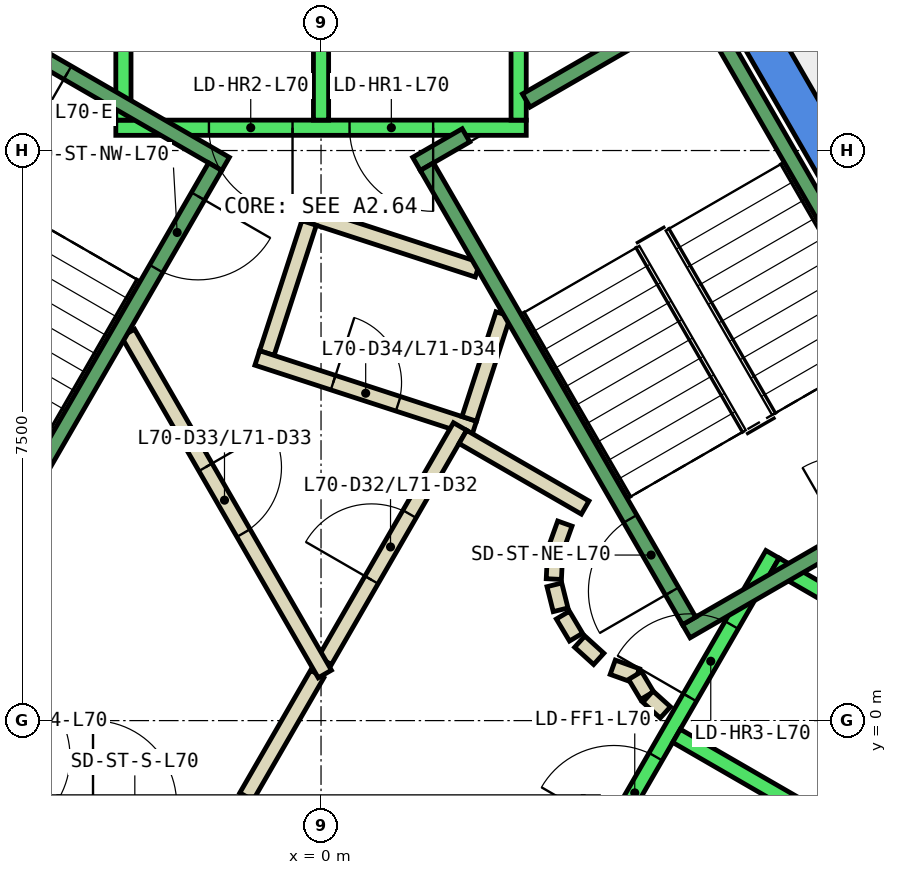
"""IFC4 building model, lengths in metres.
Left out: names, types, materials, properties, quantities, classifications, styles, units other than length and angle.
Written with IfcOpenShell. Run it as: python <this file> out.ifc"""

import sys

from ifc_helpers import new_model, si_unit, direction, frame, frame_2d, origin, place, context, subcontext, project, spatial, polyline, rectangle, outline, extrude, element, fill, save


model = new_model("IFC4")
c1 = context("Model", 3, precision=1e-05, world=origin(), true_north=direction((0.0, 1.0)))
c2 = subcontext(c1, "Body", "Model", "MODEL_VIEW")
j1 = project(units=[si_unit("LENGTHUNIT", "METRE"), si_unit("PLANEANGLEUNIT", "RADIAN")], contexts=[c1])
p1 = place(None, origin())
s1 = spatial("IfcSite", under=j1, at=p1, CompositionType="ELEMENT")
p2 = place(p1, origin())
s2 = spatial("IfcBuilding", under=s1, at=p2, CompositionType="ELEMENT")
p3 = place(p2, frame((0.0, 0.0, 300.8)))
s3 = spatial("IfcBuildingStorey", under=s2, at=p3, CompositionType="ELEMENT", Elevation=300.8)
p4 = place(p3, frame((0.0, 0.0, -0.34)))
e1 = element("IfcWall", 1, at=p4, inside=s3, PredefinedType="SHEAR", context=c2, shape_type="SweptSolid", body=[
    extrude(outline(polyline([(5.486, 9.998), (5.053, 9.748), (9.238, 2.5), (9.815, 2.5), (5.486, 9.998)])), origin(), (0.0, 0.0, 1.0), 3.6),
])
p5 = place(p3, frame((0.0, 0.0, -0.34)))
e2 = element("IfcWall", 2, at=p5, inside=s3, PredefinedType="SHEAR", context=c2, shape_type="SweptSolid", body=[
    extrude(outline(polyline([(4.907, -6.0), (9.815, 2.5), (9.238, 2.5), (4.619, -5.5), (4.907, -6.0)])), origin(), (0.0, 0.0, 1.0), 3.6),
])
p6 = place(p3, frame((2.06, 5.931, 0.0), z_axis=(0.0, 0.0, 1.0), x_axis=(-0.95092855133, 0.309410552932, 0.0)))
e3 = element("IfcWall", 3, at=p6, inside=s3, PredefinedType="PARTITIONING", context=c2, shape_type="SweptSolid", body=[
    extrude(rectangle(XDim=2.399, YDim=0.2, at=frame_2d((1.199, 0.0))), origin(), (0.0, 0.0, 1.0), 3.26),
])
p7 = place(p3, frame((-0.157, 6.547, 0.0), z_axis=(0.0, 0.0, 1.0), x_axis=(-0.308813127339, -0.951122732555, 0.0)))
e4 = element("IfcWall", 4, at=p7, inside=s3, PredefinedType="PARTITIONING", context=c2, shape_type="SweptSolid", body=[
    extrude(rectangle(XDim=1.8, YDim=0.2, at=frame_2d((0.9, 0.0))), origin(), (0.0, 0.0, 1.0), 3.26),
])
p8 = place(p3, frame((-0.839, 4.771, 0.0), z_axis=(0.0, 0.0, 1.0), x_axis=(0.950961084355, -0.309310549515, 0.0)))
e5 = element("IfcWall", 5, at=p8, inside=s3, PredefinedType="PARTITIONING", context=c2, shape_type="SweptSolid", body=[
    extrude(rectangle(XDim=3.0, YDim=0.2, at=frame_2d((1.5, 0.0))), origin(), (0.0, 0.0, 1.0), 3.26),
])
p9 = place(p8, frame((1.05, 0.0, 0.0)))
e6 = element("IfcOpeningElement", 6, at=p9, cuts=e5, PredefinedType="OPENING", context=c2, shape_type="SweptSolid", body=[
    extrude(rectangle(XDim=0.9, YDim=2.1, at=frame_2d((0.45, 1.05))), frame((0.0, 0.11, 0.0), z_axis=(0.0, -1.0, 0.0), x_axis=(1.0, 0.0, 0.0)), (0.0, 0.0, 1.0), 0.22),
])
p10 = place(p3, frame((1.95, 3.97, 0.0), z_axis=(0.0, 0.0, 1.0), x_axis=(0.308583003896, 0.951197418892, 0.0)))
e7 = element("IfcWall", 7, at=p10, inside=s3, PredefinedType="PARTITIONING", context=c2, shape_type="SweptSolid", body=[
    extrude(rectangle(XDim=1.449, YDim=0.2, at=frame_2d((0.724, 0.0))), origin(), (0.0, 0.0, 1.0), 3.26),
])
p11 = place(p3, frame((-0.982, -1.0, 0.0), z_axis=(0.0, 0.0, 1.0), x_axis=(0.50024047865, 0.865886518847, 0.0)))
e8 = element("IfcWall", 8, at=p11, inside=s3, PredefinedType="PARTITIONING", context=c2, shape_type="SweptSolid", body=[
    extrude(rectangle(XDim=1.863, YDim=0.2, at=frame_2d((0.931, 0.0))), origin(), (0.0, 0.0, 1.0), 3.26),
])
p12 = place(p3, frame((0.05, 0.787, 0.0), z_axis=(0.0, 0.0, 1.0), x_axis=(0.499954076797, 0.866051915934, 0.0)))
e9 = element("IfcWall", 9, at=p12, inside=s3, PredefinedType="PARTITIONING", context=c2, shape_type="SweptSolid", body=[
    extrude(rectangle(XDim=3.558, YDim=0.2, at=frame_2d((1.779, 0.0))), origin(), (0.0, 0.0, 1.0), 3.26),
])
p13 = place(p12, frame((1.229, 0.0, 0.0)))
e10 = element("IfcOpeningElement", 10, at=p13, cuts=e9, PredefinedType="OPENING", context=c2, shape_type="SweptSolid", body=[
    extrude(rectangle(XDim=1.0, YDim=2.1, at=frame_2d((0.5, 1.05))), frame((0.0, 0.11, 0.0), z_axis=(0.0, -1.0, 0.0), x_axis=(1.0, 0.0, 0.0)), (0.0, 0.0, 1.0), 0.22),
])
p14 = place(p3, frame((1.866, 3.732, 0.0), z_axis=(0.0, 0.0, 1.0), x_axis=(0.866043361281, -0.499968895414, 0.0)))
e11 = element("IfcWall", 11, at=p14, inside=s3, PredefinedType="PARTITIONING", context=c2, shape_type="SweptSolid", body=[
    extrude(rectangle(XDim=1.858, YDim=0.2, at=frame_2d((0.929, 0.0))), origin(), (0.0, 0.0, 1.0), 3.26),
])
p15 = place(p3, frame((3.208, 2.592, 0.0), z_axis=(0.0, 0.0, 1.0), x_axis=(-0.337388820924, -0.941365382578, 0.0)))
e12 = element("IfcWall", 12, at=p15, inside=s3, PredefinedType="PARTITIONING", context=c2, shape_type="SweptSolid", body=[
    extrude(rectangle(XDim=0.338, YDim=0.2, at=frame_2d((0.169, 0.0))), origin(), (0.0, 0.0, 1.0), 3.26),
])
p16 = place(p3, frame((3.079, 2.199, 0.0), z_axis=(0.0, 0.0, 1.0), x_axis=(-0.047771483479, -0.998858290933, 0.0)))
e13 = element("IfcWall", 13, at=p16, inside=s3, PredefinedType="PARTITIONING", context=c2, shape_type="SweptSolid", body=[
    extrude(rectangle(XDim=0.337, YDim=0.2, at=frame_2d((0.169, 0.0))), origin(), (0.0, 0.0, 1.0), 3.26),
])
p17 = place(p3, frame((3.07, 1.786, 0.0), z_axis=(0.0, 0.0, 1.0), x_axis=(0.242705583207, -0.970099994784, 0.0)))
e14 = element("IfcWall", 14, at=p17, inside=s3, PredefinedType="PARTITIONING", context=c2, shape_type="SweptSolid", body=[
    extrude(rectangle(XDim=0.338, YDim=0.2, at=frame_2d((0.169, 0.0))), origin(), (0.0, 0.0, 1.0), 3.26),
])
for number, where, z_axis, x_axis in (
    (15, (3.182, 1.388, 0.0), (0.0, 0.0, 1.0), (0.512, -0.859, 0.0)),
    (16, (3.404, 1.039, 0.0), (0.0, 0.0, 1.0), (0.74, -0.672, 0.0)),
):
    element("IfcWall", number, at=place(p3, frame(where, z_axis=z_axis, x_axis=x_axis)), inside=s3, PredefinedType="PARTITIONING", context=c2, shape_type="SweptSolid", body=[
        extrude(rectangle(XDim=0.338, YDim=0.2, at=frame_2d((0.169, 0.0))), origin(), (0.0, 0.0, 1.0), 3.26),
    ])
p18 = place(p3, frame((3.838, 0.702, 0.0), z_axis=(0.0, 0.0, 1.0), x_axis=(0.941035081519, -0.338308993895, 0.0)))
e17 = element("IfcWall", 17, at=p18, inside=s3, PredefinedType="PARTITIONING", context=c2, shape_type="SweptSolid", body=[
    extrude(rectangle(XDim=0.337, YDim=0.2, at=frame_2d((0.168, 0.0))), origin(), (0.0, 0.0, 1.0), 3.26),
])
p19 = place(p3, frame((4.132, 0.593, 0.0), z_axis=(0.0, 0.0, 1.0), x_axis=(0.513561617048, -0.858052717201, 0.0)))
e18 = element("IfcWall", 18, at=p19, inside=s3, PredefinedType="PARTITIONING", context=c2, shape_type="SweptSolid", body=[
    extrude(rectangle(XDim=0.308, YDim=0.2, at=frame_2d((0.154, 0.0))), origin(), (0.0, 0.0, 1.0), 3.26),
])
p20 = place(p3, frame((4.301, 0.315, 0.0), z_axis=(0.0, 0.0, 1.0), x_axis=(0.741798017506, -0.670623367639, 0.0)))
e19 = element("IfcWall", 19, at=p20, inside=s3, PredefinedType="PARTITIONING", context=c2, shape_type="SweptSolid", body=[
    extrude(rectangle(XDim=0.309, YDim=0.2, at=frame_2d((0.154, 0.0))), origin(), (0.0, 0.0, 1.0), 3.26),
])
p21 = place(p3, frame((-2.54, 5.1, 0.0), z_axis=(0.0, 0.0, 1.0), x_axis=(0.499925051871, -0.866068670783, 0.0)))
e20 = element("IfcWall", 20, at=p21, inside=s3, PredefinedType="PARTITIONING", context=c2, shape_type="SweptSolid", body=[
    extrude(rectangle(XDim=5.181, YDim=0.2, at=frame_2d((2.59, 0.0))), origin(), (0.0, 0.0, 1.0), 3.26),
])
p22 = place(p21, frame((2.04, 0.0, 0.0)))
e21 = element("IfcOpeningElement", 21, at=p22, cuts=e20, PredefinedType="OPENING", context=c2, shape_type="SweptSolid", body=[
    extrude(rectangle(XDim=1.0, YDim=2.1, at=frame_2d((0.5, 1.05))), frame((0.0, 0.11, 0.0), z_axis=(0.0, -1.0, 0.0), x_axis=(1.0, 0.0, 0.0)), (0.0, 0.0, 1.0), 0.22),
])
p23 = place(p3, frame((2.7, 7.8, 0.0), z_axis=(0.0, 0.0, 1.0), x_axis=(-1.0, 0.0, 0.0)))
e22 = element("IfcWall", 22, at=p23, inside=s3, PredefinedType="STANDARD", context=c2, shape_type="SweptSolid", body=[
    extrude(rectangle(XDim=5.4, YDim=0.2, at=frame_2d((2.7, 0.0))), origin(), (0.0, 0.0, 1.0), 3.26),
])
p24 = place(p23, frame((1.225, 0.0, 0.0)))
e23 = element("IfcOpeningElement", 23, at=p24, cuts=e22, PredefinedType="OPENING", context=c2, shape_type="SweptSolid", body=[
    extrude(rectangle(XDim=1.1, YDim=2.1, at=frame_2d((0.55, 1.05))), frame((0.0, 0.11, 0.0), z_axis=(0.0, -1.0, 0.0), x_axis=(1.0, 0.0, 0.0)), (0.0, 0.0, 1.0), 0.22),
])
p25 = place(p23, frame((3.075, 0.0, 0.0)))
e24 = element("IfcOpeningElement", 24, at=p25, cuts=e22, PredefinedType="OPENING", context=c2, shape_type="SweptSolid", body=[
    extrude(rectangle(XDim=1.1, YDim=2.1, at=frame_2d((0.55, 1.05))), frame((0.0, 0.11, 0.0), z_axis=(0.0, -1.0, 0.0), x_axis=(1.0, 0.0, 0.0)), (0.0, 0.0, 1.0), 0.22),
])
for number, where, z_axis, x_axis in (
    (25, (2.6, 7.9, 0.0), (0.0, 0.0, 1.0), (0.0, 1.0, 0.0)),
    (26, (0.0, 7.9, 0.0), (0.0, 0.0, 1.0), (0.0, 1.0, 0.0)),
    (27, (-2.6, 7.9, 0.0), (0.0, 0.0, 1.0), (0.0, 1.0, 0.0)),
):
    element("IfcWall", number, at=place(p3, frame(where, z_axis=z_axis, x_axis=x_axis)), inside=s3, PredefinedType="STANDARD", context=c2, shape_type="SweptSolid", body=[
        extrude(rectangle(XDim=2.4, YDim=0.2, at=frame_2d((1.2, 0.0))), origin(), (0.0, 0.0, 1.0), 3.26),
    ])
p26 = place(p3, frame((-5.94, 2.188, 0.0), z_axis=(0.0, 0.0, 1.0), x_axis=(0.500034260056, -0.866005622828, 0.0)))
e28 = element("IfcWall", 28, at=p26, inside=s3, PredefinedType="STANDARD", context=c2, shape_type="SweptSolid", body=[
    extrude(rectangle(XDim=5.399, YDim=0.2, at=frame_2d((2.7, 0.0))), origin(), (0.0, 0.0, 1.0), 3.26),
])
p27 = place(p26, frame((3.075, 0.0, 0.0)))
e29 = element("IfcOpeningElement", 29, at=p27, cuts=e28, PredefinedType="OPENING", context=c2, shape_type="SweptSolid", body=[
    extrude(rectangle(XDim=1.1, YDim=2.1, at=frame_2d((0.55, 1.05))), frame((0.0, 0.11, 0.0), z_axis=(0.0, -1.0, 0.0), x_axis=(1.0, 0.0, 0.0)), (0.0, 0.0, 1.0), 0.22),
])
p28 = place(p26, frame((1.225, 0.0, 0.0)))
e30 = element("IfcOpeningElement", 30, at=p28, cuts=e28, PredefinedType="OPENING", context=c2, shape_type="SweptSolid", body=[
    extrude(rectangle(XDim=1.1, YDim=2.1, at=frame_2d((0.55, 1.05))), frame((0.0, 0.11, 0.0), z_axis=(0.0, -1.0, 0.0), x_axis=(1.0, 0.0, 0.0)), (0.0, 0.0, 1.0), 0.22),
])
p29 = place(p3, frame((3.24, -2.488, 0.0), z_axis=(0.0, 0.0, 1.0), x_axis=(0.500034260056, 0.866005622828, 0.0)))
e31 = element("IfcWall", 31, at=p29, inside=s3, PredefinedType="STANDARD", context=c2, shape_type="SweptSolid", body=[
    extrude(rectangle(XDim=5.399, YDim=0.2, at=frame_2d((2.7, 0.0))), origin(), (0.0, 0.0, 1.0), 3.26),
])
p30 = place(p29, frame((3.225, 0.0, 0.0)))
e32 = element("IfcOpeningElement", 32, at=p30, cuts=e31, PredefinedType="OPENING", context=c2, shape_type="SweptSolid", body=[
    extrude(rectangle(XDim=1.1, YDim=2.1, at=frame_2d((0.55, 1.05))), frame((0.0, 0.11, 0.0), z_axis=(0.0, -1.0, 0.0), x_axis=(1.0, 0.0, 0.0)), (0.0, 0.0, 1.0), 0.22),
])
p31 = place(p29, frame((1.225, 0.0, 0.0)))
e33 = element("IfcOpeningElement", 33, at=p31, cuts=e31, PredefinedType="OPENING", context=c2, shape_type="SweptSolid", body=[
    extrude(rectangle(XDim=1.1, YDim=2.1, at=frame_2d((0.55, 1.05))), frame((0.0, 0.11, 0.0), z_axis=(0.0, -1.0, 0.0), x_axis=(1.0, 0.0, 0.0)), (0.0, 0.0, 1.0), 0.22),
])
p32 = place(p3, frame((5.492, -3.788, 0.0), z_axis=(0.0, 0.0, 1.0), x_axis=(0.500034260056, 0.866005622828, 0.0)))
e34 = element("IfcWall", 34, at=p32, inside=s3, PredefinedType="STANDARD", context=c2, shape_type="SweptSolid", body=[
    extrude(rectangle(XDim=5.399, YDim=0.2, at=frame_2d((2.7, 0.0))), origin(), (0.0, 0.0, 1.0), 3.26),
])
for number, where, z_axis, x_axis in (
    (35, (4.677, -0.2, 0.0), (0.0, 0.0, 1.0), (0.866, -0.5, 0.0)),
    (36, (5.977, 2.052, 0.0), (0.0, 0.0, 1.0), (0.866, -0.5, 0.0)),
):
    element("IfcWall", number, at=place(p3, frame(where, z_axis=z_axis, x_axis=x_axis)), inside=s3, PredefinedType="STANDARD", context=c2, shape_type="SweptSolid", body=[
        extrude(rectangle(XDim=2.399, YDim=0.2, at=frame_2d((1.2, 0.0))), origin(), (0.0, 0.0, 1.0), 3.26),
    ])
p33 = place(p3, frame((4.806, 1.176, 0.0), z_axis=(0.0, 0.0, 1.0), x_axis=(0.866059941101, 0.499940174841, 0.0)))
e37 = element("IfcWall", 37, at=p33, inside=s3, PredefinedType="STANDARD", context=c2, shape_type="SweptSolid", body=[
    extrude(rectangle(XDim=4.4, YDim=0.2, at=frame_2d((2.2, 0.0))), origin(), (0.0, 0.0, 1.0), 3.26),
])
p34 = place(p33, frame((2.4, 0.0, 0.0)))
e38 = element("IfcOpeningElement", 38, at=p34, cuts=e37, PredefinedType="OPENING", context=c2, shape_type="SweptSolid", body=[
    extrude(rectangle(XDim=1.1, YDim=2.2, at=frame_2d((0.55, 1.1))), frame((0.0, 0.11, 0.0), z_axis=(0.0, -1.0, 0.0), x_axis=(1.0, 0.0, 0.0)), (0.0, 0.0, 1.0), 0.22),
])
p35 = place(p3, frame((2.7, 8.158, 0.0), z_axis=(0.0, 0.0, 1.0), x_axis=(0.86611865017, 0.499838457731, 0.0)))
e39 = element("IfcWall", 39, at=p35, inside=s3, PredefinedType="STANDARD", context=c2, shape_type="SweptSolid", body=[
    extrude(rectangle(XDim=2.733, YDim=0.2, at=frame_2d((1.366, 0.0))), origin(), (0.0, 0.0, 1.0), 3.26),
])
p36 = place(p3, frame((1.256, 7.324, 0.0), z_axis=(0.0, 0.0, 1.0), x_axis=(0.865915093549, 0.500191014278, 0.0)))
e40 = element("IfcWall", 40, at=p36, inside=s3, PredefinedType="STANDARD", context=c2, shape_type="SweptSolid", body=[
    extrude(rectangle(XDim=0.752, YDim=0.2, at=frame_2d((0.376, 0.0))), origin(), (0.0, 0.0, 1.0), 3.26),
])
p37 = place(p3, frame((4.843, 1.312, 0.0), z_axis=(0.0, 0.0, 1.0), x_axis=(-0.499963383562, 0.866046543262, 0.0)))
e41 = element("IfcWall", 41, at=p37, inside=s3, PredefinedType="STANDARD", context=c2, shape_type="SweptSolid", body=[
    extrude(rectangle(XDim=6.9, YDim=0.2, at=frame_2d((3.45, 0.0))), origin(), (0.0, 0.0, 1.0), 3.26),
])
p38 = place(p37, frame((0.45, 0.0, 0.0)))
e42 = element("IfcOpeningElement", 42, at=p38, cuts=e41, PredefinedType="OPENING", context=c2, shape_type="SweptSolid", body=[
    extrude(rectangle(XDim=1.1, YDim=2.2, at=frame_2d((0.55, 1.1))), frame((0.0, 0.11, 0.0), z_axis=(0.0, -1.0, 0.0), x_axis=(1.0, 0.0, 0.0)), (0.0, 0.0, 1.0), 0.22),
])
p39 = place(p3, frame((8.48, 3.412, 0.0), z_axis=(0.0, 0.0, 1.0), x_axis=(-0.499978703459, 0.866037698999, 0.0)))
e43 = element("IfcWall", 43, at=p39, inside=s3, PredefinedType="STANDARD", context=c2, shape_type="SweptSolid", body=[
    extrude(rectangle(XDim=6.9, YDim=0.2, at=frame_2d((3.45, 0.0))), origin(), (0.0, 0.0, 1.0), 3.26),
])
p40 = place(p3, frame((-1.256, 7.324, 0.0), z_axis=(0.0, 0.0, 1.0), x_axis=(-0.866046073146, 0.499964197906, 0.0)))
e44 = element("IfcWall", 44, at=p40, inside=s3, PredefinedType="STANDARD", context=c2, shape_type="SweptSolid", body=[
    extrude(rectangle(XDim=4.4, YDim=0.2, at=frame_2d((2.2, 0.0))), origin(), (0.0, 0.0, 1.0), 3.26),
])
p41 = place(p40, frame((2.4, 0.0, 0.0)))
e45 = element("IfcOpeningElement", 45, at=p41, cuts=e44, PredefinedType="OPENING", context=c2, shape_type="SweptSolid", body=[
    extrude(rectangle(XDim=1.1, YDim=2.2, at=frame_2d((0.55, 1.1))), frame((0.0, 0.11, 0.0), z_axis=(0.0, -1.0, 0.0), x_axis=(1.0, 0.0, 0.0)), (0.0, 0.0, 1.0), 0.22),
])
p42 = place(p3, frame((-1.393, 7.288, 0.0), z_axis=(0.0, 0.0, 1.0), x_axis=(-0.499963383562, -0.866046543262, 0.0)))
e46 = element("IfcWall", 46, at=p42, inside=s3, PredefinedType="STANDARD", context=c2, shape_type="SweptSolid", body=[
    extrude(rectangle(XDim=6.9, YDim=0.2, at=frame_2d((3.45, 0.0))), origin(), (0.0, 0.0, 1.0), 3.26),
])
p43 = place(p42, frame((0.45, 0.0, 0.0)))
e47 = element("IfcOpeningElement", 47, at=p43, cuts=e46, PredefinedType="OPENING", context=c2, shape_type="SweptSolid", body=[
    extrude(rectangle(XDim=1.1, YDim=2.2, at=frame_2d((0.55, 1.1))), frame((0.0, 0.11, 0.0), z_axis=(0.0, -1.0, 0.0), x_axis=(1.0, 0.0, 0.0)), (0.0, 0.0, 1.0), 0.22),
])
p44 = place(p13, origin())
e48 = element("IfcDoor", 48, at=p44, inside=s3, OperationType="SINGLE_SWING_RIGHT", PredefinedType="DOOR", context=c2, shape_type="SweptSolid", body=[
    extrude(rectangle(XDim=1.0, YDim=2.1, at=frame_2d((0.5, 1.05))), frame((0.0, 0.025, 0.0), z_axis=(0.0, -1.0, 0.0), x_axis=(1.0, 0.0, 0.0)), (0.0, 0.0, 1.0), 0.05),
])
fill(e10, e48)
p45 = place(p22, origin())
e49 = element("IfcDoor", 49, at=p45, inside=s3, OperationType="SINGLE_SWING_RIGHT", PredefinedType="DOOR", context=c2, shape_type="SweptSolid", body=[
    extrude(rectangle(XDim=1.0, YDim=2.1, at=frame_2d((0.5, 1.05))), frame((0.0, 0.025, 0.0), z_axis=(0.0, -1.0, 0.0), x_axis=(1.0, 0.0, 0.0)), (0.0, 0.0, 1.0), 0.05),
])
fill(e21, e49)
p46 = place(p9, origin())
e50 = element("IfcDoor", 50, at=p46, inside=s3, OperationType="SINGLE_SWING_LEFT", PredefinedType="DOOR", context=c2, shape_type="SweptSolid", body=[
    extrude(rectangle(XDim=0.9, YDim=2.1, at=frame_2d((0.45, 1.05))), frame((0.0, 0.025, 0.0), z_axis=(0.0, -1.0, 0.0), x_axis=(1.0, 0.0, 0.0)), (0.0, 0.0, 1.0), 0.05),
])
fill(e6, e50)
p47 = place(p24, origin())
e51 = element("IfcDoor", 51, at=p47, inside=s3, OperationType="SLIDING_TO_LEFT", PredefinedType="DOOR", context=c2, shape_type="SweptSolid", body=[
    extrude(rectangle(XDim=1.1, YDim=2.1, at=frame_2d((0.55, 1.05))), frame((0.0, 0.025, 0.0), z_axis=(0.0, -1.0, 0.0), x_axis=(1.0, 0.0, 0.0)), (0.0, 0.0, 1.0), 0.05),
])
fill(e23, e51)
p48 = place(p25, origin())
e52 = element("IfcDoor", 52, at=p48, inside=s3, OperationType="SLIDING_TO_LEFT", PredefinedType="DOOR", context=c2, shape_type="SweptSolid", body=[
    extrude(rectangle(XDim=1.1, YDim=2.1, at=frame_2d((0.55, 1.05))), frame((0.0, 0.025, 0.0), z_axis=(0.0, -1.0, 0.0), x_axis=(1.0, 0.0, 0.0)), (0.0, 0.0, 1.0), 0.05),
])
fill(e24, e52)
p49 = place(p30, origin())
e53 = element("IfcDoor", 53, at=p49, inside=s3, OperationType="SLIDING_TO_LEFT", PredefinedType="DOOR", context=c2, shape_type="SweptSolid", body=[
    extrude(rectangle(XDim=1.1, YDim=2.1, at=frame_2d((0.55, 1.05))), frame((0.0, 0.025, 0.0), z_axis=(0.0, -1.0, 0.0), x_axis=(1.0, 0.0, 0.0)), (0.0, 0.0, 1.0), 0.05),
])
fill(e32, e53)
p50 = place(p31, origin())
e54 = element("IfcDoor", 54, at=p50, inside=s3, OperationType="SLIDING_TO_LEFT", PredefinedType="DOOR", context=c2, shape_type="SweptSolid", body=[
    extrude(rectangle(XDim=1.1, YDim=2.1, at=frame_2d((0.55, 1.05))), frame((0.0, 0.025, 0.0), z_axis=(0.0, -1.0, 0.0), x_axis=(1.0, 0.0, 0.0)), (0.0, 0.0, 1.0), 0.05),
])
fill(e33, e54)
p51 = place(p38, origin())
e55 = element("IfcDoor", 55, at=p51, inside=s3, OperationType="SINGLE_SWING_LEFT", PredefinedType="DOOR", context=c2, shape_type="SweptSolid", body=[
    extrude(rectangle(XDim=1.1, YDim=2.2, at=frame_2d((0.55, 1.1))), frame((0.0, 0.025, 0.0), z_axis=(0.0, -1.0, 0.0), x_axis=(1.0, 0.0, 0.0)), (0.0, 0.0, 1.0), 0.05),
])
fill(e42, e55)
p52 = place(p43, origin())
e56 = element("IfcDoor", 56, at=p52, inside=s3, OperationType="SINGLE_SWING_LEFT", PredefinedType="DOOR", context=c2, shape_type="SweptSolid", body=[
    extrude(rectangle(XDim=1.1, YDim=2.2, at=frame_2d((0.55, 1.1))), frame((0.0, 0.025, 0.0), z_axis=(0.0, -1.0, 0.0), x_axis=(1.0, 0.0, 0.0)), (0.0, 0.0, 1.0), 0.05),
])
fill(e47, e56)
p53 = place(p41, origin())
e57 = element("IfcDoor", 57, at=p53, inside=s3, OperationType="SINGLE_SWING_LEFT", PredefinedType="DOOR", context=c2, shape_type="SweptSolid", body=[
    extrude(rectangle(XDim=1.1, YDim=2.2, at=frame_2d((0.55, 1.1))), frame((0.0, 0.025, 0.0), z_axis=(0.0, -1.0, 0.0), x_axis=(1.0, 0.0, 0.0)), (0.0, 0.0, 1.0), 0.05),
])
fill(e45, e57)
save(model, sys.argv[1])
